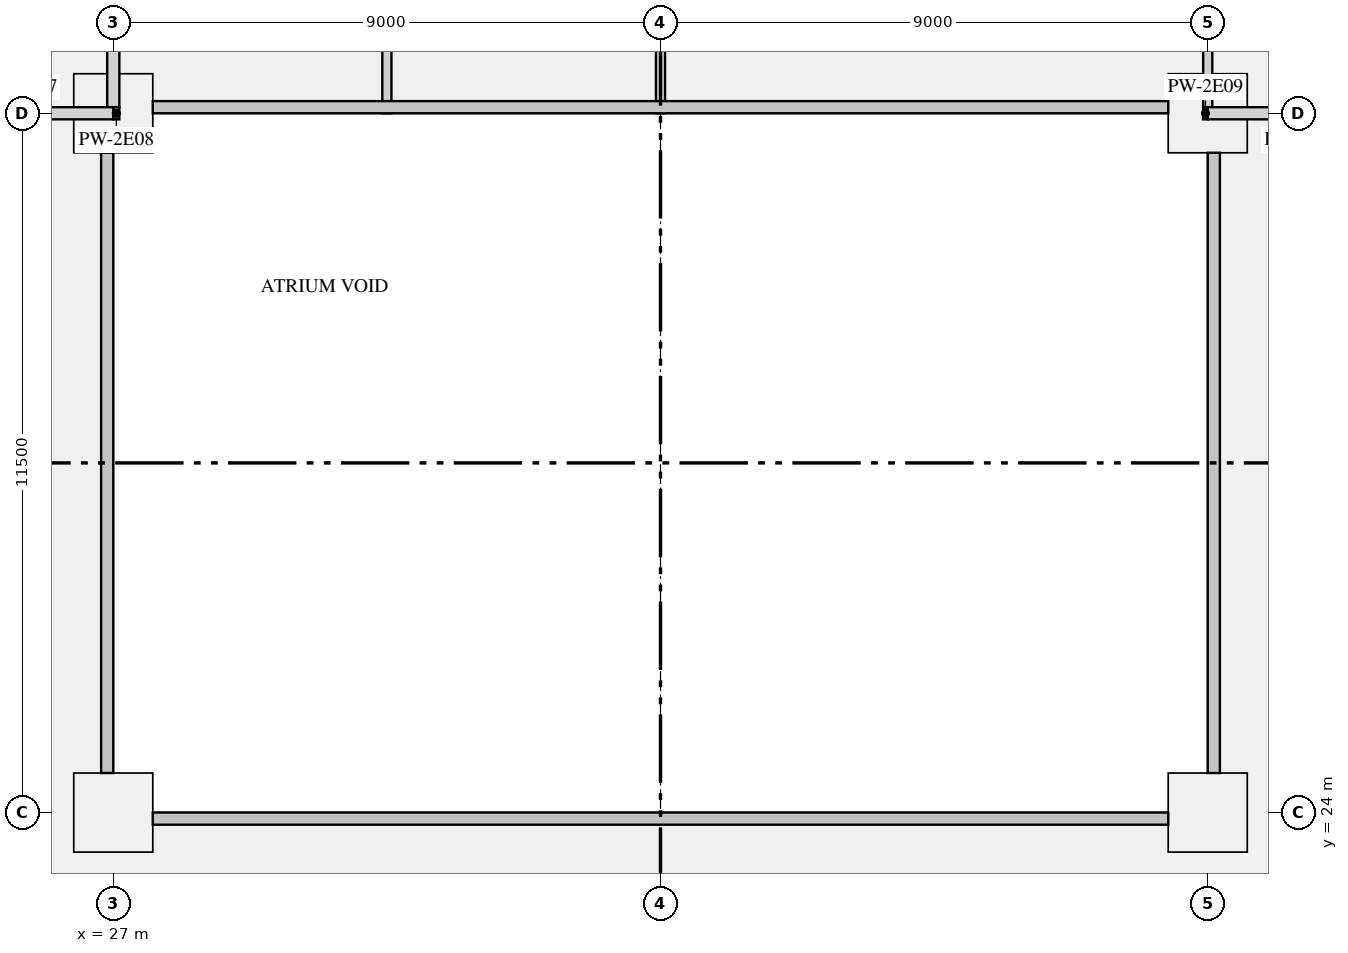
"""IFC4 building model, lengths in metres.
Left out: names, types, materials, properties, quantities, classifications, styles, units other than length and angle.
Written with IfcOpenShell. Run it as: python <this file> out.ifc"""

import sys

from ifc_helpers import new_model, si_unit, direction, frame, frame_2d, origin, origin_2d, place, context, subcontext, project, spatial, rectangle, extrude, element, save


model = new_model("IFC4")
c1 = context("Model", 3, precision=1e-05, world=origin(), true_north=direction((0.0, 1.0)))
c2 = subcontext(c1, "Body", "Model", "MODEL_VIEW")
j1 = project(units=[si_unit("LENGTHUNIT", "METRE"), si_unit("PLANEANGLEUNIT", "RADIAN")], contexts=[c1])
p1 = place(None, origin())
s1 = spatial("IfcSite", under=j1, at=p1, CompositionType="ELEMENT")
p2 = place(p1, origin())
s2 = spatial("IfcBuilding", under=s1, at=p2, CompositionType="ELEMENT")
p3 = place(p2, frame((0.0, 0.0, 118.2)))
s3 = spatial("IfcBuildingStorey", under=s2, at=p3, CompositionType="ELEMENT", Elevation=118.2)
for number, where, z_axis, x_axis in (
    (1, (27.0, 24.0, 0.0), (0.0, 0.0, 1.0), (1.0, 0.0, 0.0)),
    (2, (45.0, 24.0, 0.0), (0.0, 0.0, 1.0), (1.0, 0.0, 0.0)),
    (3, (27.0, 35.5, 0.0), (0.0, 0.0, 1.0), (1.0, 0.0, 0.0)),
    (4, (45.0, 35.5, 0.0), (0.0, 0.0, 1.0), (1.0, 0.0, 0.0)),
):
    element("IfcColumn", number, at=place(p3, frame(where, z_axis=z_axis, x_axis=x_axis)), inside=s3, PredefinedType="COLUMN", context=c2, shape_type="SweptSolid", body=[
        extrude(rectangle(XDim=1.3, YDim=1.3, at=origin_2d()), origin(), (0.0, 0.0, 1.0), 3.15),
    ])
p4 = place(p3, frame((23.9, 35.5, 0.0), z_axis=(0.0, 0.0, 1.0), x_axis=(1.0, 0.0, 0.0)))
e5 = element("IfcWall", 5, at=p4, inside=s3, PredefinedType="PARTITIONING", context=c2, shape_type="SweptSolid", body=[
    extrude(rectangle(XDim=3.1, YDim=0.2, at=frame_2d((1.55, 0.0))), origin(), (0.0, 0.0, 1.0), 2.83),
])
p5 = place(p3, frame((27.0, 35.5, 0.0), z_axis=(0.0, 0.0, 1.0), x_axis=(1.0, 0.0, 0.0)))
e6 = element("IfcWall", 6, at=p5, inside=s3, PredefinedType="PARTITIONING", context=c2, shape_type="SweptSolid", body=[
    extrude(rectangle(XDim=0.1, YDim=0.2, at=frame_2d((0.05, 0.0))), origin(), (0.0, 0.0, 1.0), 2.83),
])
p6 = place(p3, frame((44.925, 35.5, 0.0), z_axis=(0.0, 0.0, 1.0), x_axis=(1.0, 0.0, 0.0)))
e7 = element("IfcWall", 7, at=p6, inside=s3, PredefinedType="PARTITIONING", context=c2, shape_type="SweptSolid", body=[
    extrude(rectangle(XDim=0.075, YDim=0.2, at=frame_2d((0.038, 0.0))), origin(), (0.0, 0.0, 1.0), 2.83),
])
p7 = place(p3, frame((45.0, 35.5, 0.0), z_axis=(0.0, 0.0, 1.0), x_axis=(1.0, 0.0, 0.0)))
e8 = element("IfcWall", 8, at=p7, inside=s3, PredefinedType="PARTITIONING", context=c2, shape_type="SweptSolid", body=[
    extrude(rectangle(XDim=3.1, YDim=0.2, at=frame_2d((1.55, 0.0))), origin(), (0.0, 0.0, 1.0), 2.83),
])
p8 = place(p3, frame((27.0, 35.6, 0.0), z_axis=(0.0, 0.0, 1.0), x_axis=(0.0, 1.0, 0.0)))
e9 = element("IfcWall", 9, at=p8, inside=s3, PredefinedType="PARTITIONING", context=c2, shape_type="SweptSolid", body=[
    extrude(rectangle(XDim=9.15, YDim=0.2, at=frame_2d((4.575, 0.0))), origin(), (0.0, 0.0, 1.0), 2.83),
])
p9 = place(p3, frame((31.5, 35.5, 0.0), z_axis=(0.0, 0.0, 1.0), x_axis=(0.0, 1.0, 0.0)))
e10 = element("IfcWall", 10, at=p9, inside=s3, PredefinedType="PARTITIONING", context=c2, shape_type="SweptSolid", body=[
    extrude(rectangle(XDim=9.25, YDim=0.15, at=frame_2d((4.625, 0.0))), origin(), (0.0, 0.0, 1.0), 2.83),
])
p10 = place(p9, frame((4.25, 0.0, 0.0)))
e11 = element("IfcOpeningElement", 11, at=p10, cuts=e10, PredefinedType="OPENING", context=c2, shape_type="SweptSolid", body=[
    extrude(rectangle(XDim=0.9, YDim=2.1, at=frame_2d((0.45, 1.05))), frame((0.0, 0.085, 0.0), z_axis=(0.0, -1.0, 0.0), x_axis=(1.0, 0.0, 0.0)), (0.0, 0.0, 1.0), 0.17),
])
p11 = place(p3, frame((36.0, 35.5, 0.0), z_axis=(0.0, 0.0, 1.0), x_axis=(0.0, 1.0, 0.0)))
e12 = element("IfcWall", 12, at=p11, inside=s3, PredefinedType="PARTITIONING", context=c2, shape_type="SweptSolid", body=[
    extrude(rectangle(XDim=9.25, YDim=0.15, at=frame_2d((4.625, 0.0))), origin(), (0.0, 0.0, 1.0), 2.83),
])
p12 = place(p11, frame((3.95, 0.0, 0.0)))
e13 = element("IfcOpeningElement", 13, at=p12, cuts=e12, PredefinedType="OPENING", context=c2, shape_type="SweptSolid", body=[
    extrude(rectangle(XDim=1.5, YDim=2.1, at=frame_2d((0.75, 1.05))), frame((0.0, 0.085, 0.0), z_axis=(0.0, -1.0, 0.0), x_axis=(1.0, 0.0, 0.0)), (0.0, 0.0, 1.0), 0.17),
])
p13 = place(p3, frame((45.0, 35.6, 0.0), z_axis=(0.0, 0.0, 1.0), x_axis=(0.0, 1.0, 0.0)))
e14 = element("IfcWall", 14, at=p13, inside=s3, PredefinedType="PARTITIONING", context=c2, shape_type="SweptSolid", body=[
    extrude(rectangle(XDim=9.15, YDim=0.15, at=frame_2d((4.575, 0.0))), origin(), (0.0, 0.0, 1.0), 2.83),
])
p14 = place(p13, frame((1.725, 0.0, 0.0)))
e15 = element("IfcOpeningElement", 15, at=p14, cuts=e14, PredefinedType="OPENING", context=c2, shape_type="SweptSolid", body=[
    extrude(rectangle(XDim=1.5, YDim=2.1, at=frame_2d((0.75, 1.05))), frame((0.0, 0.085, 0.0), z_axis=(0.0, -1.0, 0.0), x_axis=(1.0, 0.0, 0.0)), (0.0, 0.0, 1.0), 0.17),
])
save(model, sys.argv[1])
